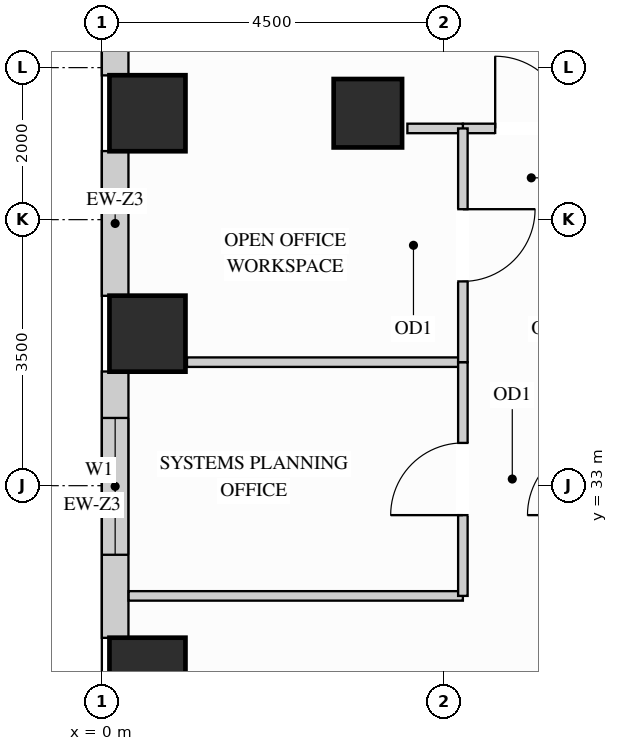
"""IFC4 building model, lengths in metres.
Left out: names, types, materials, properties, quantities, classifications, styles, units other than length and angle.
Written with IfcOpenShell. Run it as: python <this file> out.ifc"""

import sys

from ifc_helpers import new_model, si_unit, direction, frame, frame_2d, origin, origin_2d, place, context, subcontext, project, spatial, rectangle, extrude, source, transform, mapped, element, fill, save


model = new_model("IFC4")
c1 = context("Model", 3, precision=1e-05, world=origin(), true_north=direction((0.0, 1.0)))
c2 = subcontext(c1, "Body", "Model", "MODEL_VIEW")
j1 = project(units=[si_unit("LENGTHUNIT", "METRE"), si_unit("PLANEANGLEUNIT", "RADIAN")], contexts=[c1])
p1 = place(None, origin())
s1 = spatial("IfcSite", under=j1, at=p1, CompositionType="ELEMENT")
p2 = place(p1, origin())
s2 = spatial("IfcBuilding", under=s1, at=p2, CompositionType="ELEMENT")
p3 = place(p2, frame((0.0, 0.0, 189.9)))
s3 = spatial("IfcBuildingStorey", under=s2, at=p3, CompositionType="ELEMENT", Elevation=189.9)
m1 = source(origin(), c2, "Body", "SweptSolid", [
    extrude(rectangle(XDim=0.9, YDim=0.9, at=origin_2d()), origin(), (0.0, 0.0, 1.0), 3.4),
])
p4 = place(p3, frame((3.5, 37.9, 0.0), z_axis=(0.0, 0.0, 1.0), x_axis=(1.0, 0.0, 0.0)))
e1 = element("IfcColumn", 1, at=p4, inside=s3, PredefinedType="COLUMN", context=c2, shape_type="MappedRepresentation", body=[
    mapped(m1, transform((0.0, 0.0, 0.0), x_axis=(1.0, 0.0, 0.0), y_axis=(0.0, 1.0, 0.0), z_axis=(0.0, 0.0, 1.0))),
])
m2 = source(origin(), c2, "Body", "SweptSolid", [
    extrude(rectangle(XDim=1.0, YDim=1.0, at=origin_2d()), origin(), (0.0, 0.0, 1.0), 3.4),
])
for number, where, z_axis, x_axis in (
    (2, (0.6, 30.5, 0.0), (0.0, 0.0, 1.0), (1.0, 0.0, 0.0)),
    (3, (0.6, 35.0, 0.0), (0.0, 0.0, 1.0), (1.0, 0.0, 0.0)),
    (4, (0.6, 37.9, 0.0), (0.0, 0.0, 1.0), (1.0, 0.0, 0.0)),
):
    element("IfcColumn", number, at=place(p3, frame(where, z_axis=z_axis, x_axis=x_axis)), inside=s3, PredefinedType="COLUMN", context=c2, shape_type="MappedRepresentation", body=[
        mapped(m2, transform((0.0, 0.0, 0.0), x_axis=(1.0, 0.0, 0.0), y_axis=(0.0, 1.0, 0.0), z_axis=(0.0, 0.0, 1.0))),
    ])
m3 = source(origin(), c2, "Body", "SweptSolid", [
    extrude(rectangle(XDim=0.754, YDim=0.35, at=frame_2d((0.377, 0.0))), origin(), (0.0, 0.0, 1.0), 3.385),
])
p5 = place(p3, frame((0.175, 39.152, 0.0), z_axis=(0.0, 0.0, 1.0), x_axis=(0.0, -1.0, 0.0)))
e5 = element("IfcWall", 5, at=p5, inside=s3, PredefinedType="SOLIDWALL", context=c2, shape_type="MappedRepresentation", body=[
    mapped(m3, transform((0.0, 0.0, 0.0), x_axis=(1.0, 0.0, 0.0), y_axis=(0.0, 1.0, 0.0), z_axis=(0.0, 0.0, 1.0))),
])
m4 = source(origin(), c2, "Body", "SweptSolid", [
    extrude(rectangle(XDim=1.904, YDim=0.35, at=frame_2d((0.952, 0.0))), origin(), (0.0, 0.0, 1.0), 2.612),
])
p6 = place(p3, frame((0.175, 37.402, 0.0), z_axis=(0.0, 0.0, 1.0), x_axis=(0.0, -1.0, 0.0)))
e6 = element("IfcWall", 6, at=p6, inside=s3, PredefinedType="SOLIDWALL", context=c2, shape_type="MappedRepresentation", body=[
    mapped(m4, transform((0.0, 0.0, 0.0), x_axis=(1.0, 0.0, 0.0), y_axis=(0.0, 1.0, 0.0), z_axis=(0.0, 0.0, 1.0))),
])
p7 = place(p3, frame((0.175, 34.502, 0.0), z_axis=(0.0, 0.0, 1.0), x_axis=(0.0, -1.0, 0.0)))
e7 = element("IfcWall", 7, at=p7, inside=s3, PredefinedType="SOLIDWALL", context=c2, shape_type="SweptSolid", body=[
    extrude(rectangle(XDim=3.504, YDim=0.35, at=frame_2d((1.752, 0.0))), origin(), (0.0, 0.0, 1.0), 2.612),
])
p8 = place(p7, frame((0.611, 0.0, 0.78)))
e8 = element("IfcOpeningElement", 8, at=p8, cuts=e7, PredefinedType="OPENING", context=c2, shape_type="SweptSolid", body=[
    extrude(rectangle(XDim=1.8, YDim=1.652, at=frame_2d((0.9, 0.826))), frame((0.0, 0.185, 0.0), z_axis=(0.0, -1.0, 0.0), x_axis=(1.0, 0.0, 0.0)), (0.0, 0.0, 1.0), 0.37),
])
m5 = source(origin(), c2, "Body", "SweptSolid", [
    extrude(rectangle(XDim=4.398, YDim=0.125, at=frame_2d((2.199, 0.0))), origin(), (0.0, 0.0, 1.0), 3.385),
])
p9 = place(p3, frame((0.352, 31.55, 0.0), z_axis=(0.0, 0.0, 1.0), x_axis=(1.0, 0.0, 0.0)))
e9 = element("IfcWall", 9, at=p9, inside=s3, PredefinedType="PARTITIONING", context=c2, shape_type="MappedRepresentation", body=[
    mapped(m5, transform((0.0, 0.0, 0.0), x_axis=(1.0, 0.0, 0.0), y_axis=(0.0, 1.0, 0.0), z_axis=(0.0, 0.0, 1.0))),
])
m6 = source(origin(), c2, "Body", "SweptSolid", [
    extrude(rectangle(XDim=3.63, YDim=0.125, at=frame_2d((1.815, 0.0))), origin(), (0.0, 0.0, 1.0), 3.385),
])
p10 = place(p3, frame((1.12, 34.625, 0.0), z_axis=(0.0, 0.0, 1.0), x_axis=(1.0, 0.0, 0.0)))
e10 = element("IfcWall", 10, at=p10, inside=s3, PredefinedType="PARTITIONING", context=c2, shape_type="MappedRepresentation", body=[
    mapped(m6, transform((0.0, 0.0, 0.0), x_axis=(1.0, 0.0, 0.0), y_axis=(0.0, 1.0, 0.0), z_axis=(0.0, 0.0, 1.0))),
])
p11 = place(p3, frame((4.75, 37.7, 0.0), z_axis=(0.0, 0.0, 1.0), x_axis=(1.0, 0.0, 0.0)))
e11 = element("IfcWall", 11, at=p11, inside=s3, PredefinedType="PARTITIONING", context=c2, shape_type="SweptSolid", body=[
    extrude(rectangle(XDim=1.8, YDim=0.125, at=frame_2d((0.9, 0.0))), origin(), (0.0, 0.0, 1.0), 2.773),
])
p12 = place(p11, frame((0.425, 0.0, 0.0)))
e12 = element("IfcOpeningElement", 12, at=p12, cuts=e11, PredefinedType="OPENING", context=c2, shape_type="SweptSolid", body=[
    extrude(rectangle(XDim=0.95, YDim=2.15, at=frame_2d((0.475, 1.075))), frame((0.0, 0.073, 0.0), z_axis=(0.0, -1.0, 0.0), x_axis=(1.0, 0.0, 0.0)), (0.0, 0.0, 1.0), 0.145),
])
m7 = source(origin(), c2, "Body", "SweptSolid", [
    extrude(rectangle(XDim=0.73, YDim=0.125, at=frame_2d((0.365, 0.0))), origin(), (0.0, 0.0, 1.0), 2.773),
])
p13 = place(p3, frame((4.02, 37.7, 0.0), z_axis=(0.0, 0.0, 1.0), x_axis=(1.0, 0.0, 0.0)))
e13 = element("IfcWall", 13, at=p13, inside=s3, PredefinedType="PARTITIONING", context=c2, shape_type="MappedRepresentation", body=[
    mapped(m7, transform((0.0, 0.0, 0.0), x_axis=(1.0, 0.0, 0.0), y_axis=(0.0, 1.0, 0.0), z_axis=(0.0, 0.0, 1.0))),
])
p14 = place(p3, frame((4.75, 31.55, 0.0), z_axis=(0.0, 0.0, 1.0), x_axis=(0.0, 1.0, 0.0)))
e14 = element("IfcWall", 14, at=p14, inside=s3, PredefinedType="PARTITIONING", context=c2, shape_type="SweptSolid", body=[
    extrude(rectangle(XDim=3.075, YDim=0.125, at=frame_2d((1.538, 0.0))), origin(), (0.0, 0.0, 1.0), 3.385),
])
p15 = place(p14, frame((1.062, 0.0, 0.0)))
e15 = element("IfcOpeningElement", 15, at=p15, cuts=e14, PredefinedType="OPENING", context=c2, shape_type="SweptSolid", body=[
    extrude(rectangle(XDim=0.95, YDim=2.15, at=frame_2d((0.475, 1.075))), frame((0.0, 0.073, 0.0), z_axis=(0.0, -1.0, 0.0), x_axis=(1.0, 0.0, 0.0)), (0.0, 0.0, 1.0), 0.145),
])
p16 = place(p3, frame((4.75, 34.625, 0.0), z_axis=(0.0, 0.0, 1.0), x_axis=(0.0, 1.0, 0.0)))
e16 = element("IfcWall", 16, at=p16, inside=s3, PredefinedType="PARTITIONING", context=c2, shape_type="SweptSolid", body=[
    extrude(rectangle(XDim=3.075, YDim=0.125, at=frame_2d((1.538, 0.0))), origin(), (0.0, 0.0, 1.0), 3.385),
])
p17 = place(p16, frame((1.062, 0.0, 0.0)))
e17 = element("IfcOpeningElement", 17, at=p17, cuts=e16, PredefinedType="OPENING", context=c2, shape_type="SweptSolid", body=[
    extrude(rectangle(XDim=0.95, YDim=2.15, at=frame_2d((0.475, 1.075))), frame((0.0, 0.073, 0.0), z_axis=(0.0, -1.0, 0.0), x_axis=(1.0, 0.0, 0.0)), (0.0, 0.0, 1.0), 0.145),
])
m8 = source(origin(), c2, "Body", "SweptSolid", [
    extrude(rectangle(XDim=0.95, YDim=2.15, at=frame_2d((0.475, 1.075))), frame((0.0, 0.025, 0.0), z_axis=(0.0, -1.0, 0.0), x_axis=(1.0, 0.0, 0.0)), (0.0, 0.0, 1.0), 0.05),
])
p18 = place(p12, origin())
e18 = element("IfcDoor", 18, at=p18, inside=s3, OperationType="SINGLE_SWING_LEFT", PredefinedType="DOOR", context=c2, shape_type="MappedRepresentation", body=[
    mapped(m8, transform((0.0, 0.0, 0.0), x_axis=(1.0, 0.0, 0.0), y_axis=(0.0, 1.0, 0.0), z_axis=(0.0, 0.0, 1.0))),
])
fill(e12, e18)
p19 = place(p15, origin())
e19 = element("IfcDoor", 19, at=p19, inside=s3, OperationType="SINGLE_SWING_LEFT", PredefinedType="DOOR", context=c2, shape_type="MappedRepresentation", body=[
    mapped(m8, transform((0.0, 0.0, 0.0), x_axis=(1.0, 0.0, 0.0), y_axis=(0.0, 1.0, 0.0), z_axis=(0.0, 0.0, 1.0))),
])
fill(e15, e19)
p20 = place(p17, origin())
e20 = element("IfcDoor", 20, at=p20, inside=s3, OperationType="SINGLE_SWING_RIGHT", PredefinedType="DOOR", context=c2, shape_type="MappedRepresentation", body=[
    mapped(m8, transform((0.0, 0.0, 0.0), x_axis=(1.0, 0.0, 0.0), y_axis=(0.0, 1.0, 0.0), z_axis=(0.0, 0.0, 1.0))),
])
fill(e17, e20)
m9 = source(origin(), c2, "Body", "SweptSolid", [
    extrude(rectangle(XDim=1.8, YDim=1.652, at=frame_2d((0.9, 0.826))), frame((0.0, 0.03, 0.0), z_axis=(0.0, -1.0, 0.0), x_axis=(1.0, 0.0, 0.0)), (0.0, 0.0, 1.0), 0.06),
])
p21 = place(p8, origin())
e21 = element("IfcWindow", 21, at=p21, inside=s3, PartitioningType="SINGLE_PANEL", PredefinedType="WINDOW", context=c2, shape_type="MappedRepresentation", body=[
    mapped(m9, transform((0.0, 0.0, 0.0), x_axis=(1.0, 0.0, 0.0), y_axis=(0.0, 1.0, 0.0), z_axis=(0.0, 0.0, 1.0))),
])
fill(e8, e21)
save(model, sys.argv[1])
